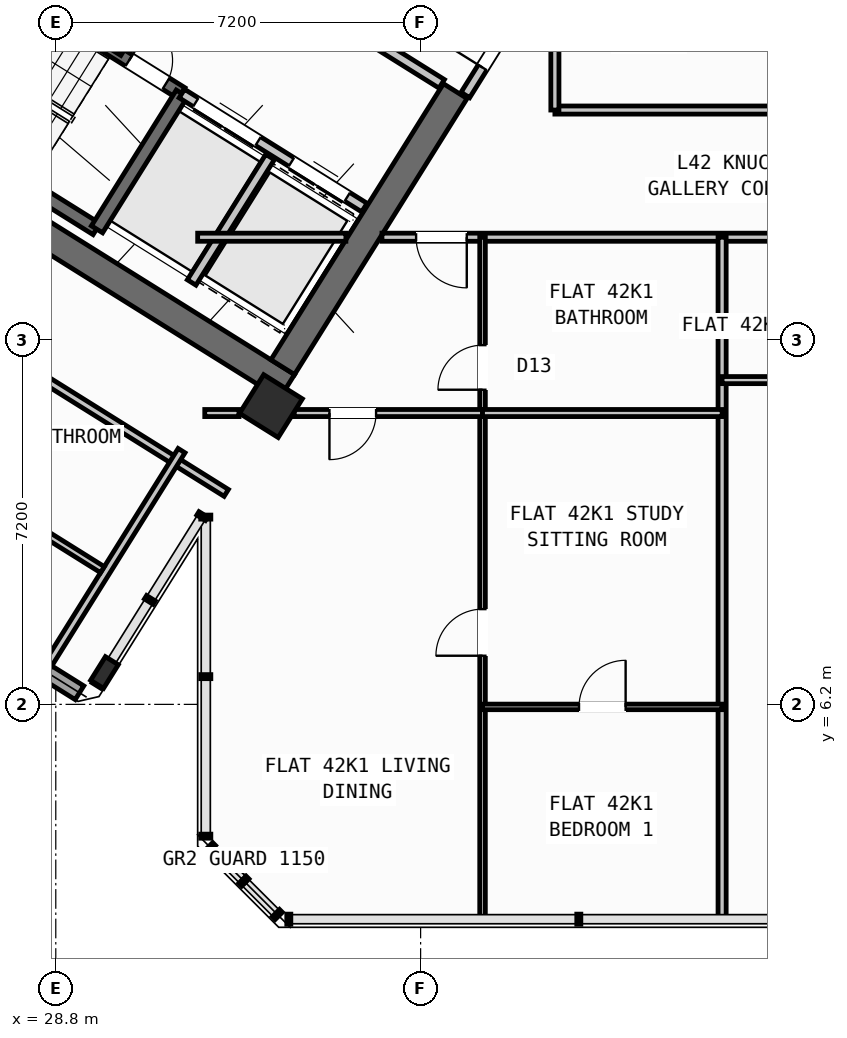
"""IFC4 building model, lengths in metres.
Left out: names, types, materials, properties, quantities, classifications, styles, units other than length and angle.
Written with IfcOpenShell. Run it as: python <this file> out.ifc"""

import sys

from ifc_helpers import new_model, si_unit, direction, frame, frame_2d, origin, origin_2d, place, context, subcontext, project, spatial, rectangle, hollow_rectangle, i_section, extrude, source, transform, mapped, element, fill, save


model = new_model("IFC4")
c1 = context("Model", 3, precision=1e-05, world=origin(), true_north=direction((0.0, 1.0)))
c2 = subcontext(c1, "Body", "Model", "MODEL_VIEW")
j1 = project(units=[si_unit("LENGTHUNIT", "METRE"), si_unit("PLANEANGLEUNIT", "RADIAN")], contexts=[c1])
p1 = place(None, origin())
s1 = spatial("IfcSite", under=j1, at=p1, CompositionType="ELEMENT")
p2 = place(p1, origin())
s2 = spatial("IfcBuilding", under=s1, at=p2, CompositionType="ELEMENT")
p3 = place(p2, frame((0.0, 0.0, 165.9)))
s3 = spatial("IfcBuildingStorey", under=s2, at=p3, CompositionType="ELEMENT", Elevation=165.9)
p4 = place(p3, frame((33.366, 12.477, 0.0), z_axis=(0.0, 0.0, 1.0), x_axis=(-0.848047359947, 0.529920442413, 0.0)))
e1 = element("IfcWall", 1, at=p4, inside=s3, PredefinedType="SHEAR", context=c2, shape_type="SweptSolid", body=[
    extrude(rectangle(XDim=13.14, YDim=0.55, at=frame_2d((6.57, 0.0))), origin(), (0.0, 0.0, 1.0), 3.32),
])
p5 = place(p3, frame((36.683, 18.304, 0.0), z_axis=(0.0, 0.0, 1.0), x_axis=(-0.529896466841, -0.848062341122, 0.0)))
e2 = element("IfcWall", 2, at=p5, inside=s3, PredefinedType="SHEAR", context=c2, shape_type="SweptSolid", body=[
    extrude(rectangle(XDim=6.425, YDim=0.55, at=frame_2d((3.212, 0.0))), origin(), (0.0, 0.0, 1.0), 3.32),
])
m1 = source(origin(), c2, "Body", "SweptSolid", [
    extrude(hollow_rectangle(XDim=0.9, YDim=0.9, WallThickness=0.036, at=origin_2d()), origin(), (0.0, 0.0, 1.0), 3.6),
])
p6 = place(p3, frame((33.046, 12.087, 0.0), z_axis=(0.0, 0.0, 1.0), x_axis=(-0.848048096156, 0.529919264233, 0.0)))
e3 = element("IfcColumn", 3, at=p6, inside=s3, PredefinedType="COLUMN", context=c2, shape_type="MappedRepresentation", body=[
    mapped(m1, transform((0.0, 0.0, 0.0), scale=1.0)),
])
m2 = source(origin(), c2, "Body", "SweptSolid", [
    extrude(i_section(OverallWidth=0.3, OverallDepth=0.55, WebThickness=0.015, FlangeThickness=0.029, at=origin_2d()), origin(), (0.0, 0.0, 1.0), 3.6),
])
p7 = place(p3, frame((29.761, 6.829, 0.0), z_axis=(0.0, 0.0, 1.0), x_axis=(-0.848048096156, 0.529919264233, 0.0)))
e4 = element("IfcColumn", 4, at=p7, inside=s3, PredefinedType="COLUMN", context=c2, shape_type="MappedRepresentation", body=[
    mapped(m2, transform((0.0, 0.0, 0.0), scale=1.0)),
])
p8 = place(p3, frame((29.268, 6.429, 0.0), z_axis=(0.0, 0.0, 1.0), x_axis=(-0.848049971435, 0.529916263149, 0.0)))
e5 = element("IfcWall", 5, at=p8, inside=s3, PredefinedType="STANDARD", context=c2, shape_type="SweptSolid", body=[
    extrude(rectangle(XDim=31.588, YDim=0.32, at=frame_2d((15.794, 0.0))), origin(), (0.0, 0.0, 1.0), 3.32),
])
p9 = place(p8, frame((16.362, 0.0, 0.0)))
e6 = element("IfcOpeningElement", 6, at=p9, cuts=e5, PredefinedType="OPENING", context=c2, shape_type="SweptSolid", body=[
    extrude(rectangle(XDim=1.2, YDim=2.15, at=frame_2d((0.6, 1.075))), frame((0.0, 0.17, 0.0), z_axis=(0.0, -1.0, 0.0), x_axis=(1.0, 0.0, 0.0)), (0.0, 0.0, 1.0), 0.34),
])
p10 = place(p8, frame((2.989, 0.0, 0.8)))
e7 = element("IfcOpeningElement", 7, at=p10, cuts=e5, PredefinedType="OPENING", context=c2, shape_type="SweptSolid", body=[
    extrude(rectangle(XDim=2.1, YDim=1.55, at=frame_2d((1.05, 0.775))), frame((0.0, 0.17, 0.0), z_axis=(0.0, -1.0, 0.0), x_axis=(1.0, 0.0, 0.0)), (0.0, 0.0, 1.0), 0.34),
])
p11 = place(p8, frame((8.359, 0.0, 0.8)))
e8 = element("IfcOpeningElement", 8, at=p11, cuts=e5, PredefinedType="OPENING", context=c2, shape_type="SweptSolid", body=[
    extrude(rectangle(XDim=2.1, YDim=1.55, at=frame_2d((1.05, 0.775))), frame((0.0, 0.17, 0.0), z_axis=(0.0, -1.0, 0.0), x_axis=(1.0, 0.0, 0.0)), (0.0, 0.0, 1.0), 0.34),
])
p12 = place(p8, frame((13.284, 0.0, 0.95)))
e9 = element("IfcOpeningElement", 9, at=p12, cuts=e5, PredefinedType="OPENING", context=c2, shape_type="SweptSolid", body=[
    extrude(rectangle(XDim=1.2, YDim=1.4, at=frame_2d((0.6, 0.7))), frame((0.0, 0.17, 0.0), z_axis=(0.0, -1.0, 0.0), x_axis=(1.0, 0.0, 0.0)), (0.0, 0.0, 1.0), 0.34),
])
p13 = place(p8, frame((20.39, 0.0, 0.95)))
e10 = element("IfcOpeningElement", 10, at=p13, cuts=e5, PredefinedType="OPENING", context=c2, shape_type="SweptSolid", body=[
    extrude(rectangle(XDim=1.2, YDim=1.4, at=frame_2d((0.6, 0.7))), frame((0.0, 0.17, 0.0), z_axis=(0.0, -1.0, 0.0), x_axis=(1.0, 0.0, 0.0)), (0.0, 0.0, 1.0), 0.34),
])
p14 = place(p8, frame((23.715, 0.0, 1.0)))
e11 = element("IfcOpeningElement", 11, at=p14, cuts=e5, PredefinedType="OPENING", context=c2, shape_type="SweptSolid", body=[
    extrude(rectangle(XDim=0.9, YDim=1.25, at=frame_2d((0.45, 0.625))), frame((0.0, 0.17, 0.0), z_axis=(0.0, -1.0, 0.0), x_axis=(1.0, 0.0, 0.0)), (0.0, 0.0, 1.0), 0.34),
])
p15 = place(p8, frame((26.106, 0.0, 0.85)))
e12 = element("IfcOpeningElement", 12, at=p15, cuts=e5, PredefinedType="OPENING", context=c2, shape_type="SweptSolid", body=[
    extrude(rectangle(XDim=1.5, YDim=1.5, at=frame_2d((0.75, 0.75))), frame((0.0, 0.17, 0.0), z_axis=(0.0, -1.0, 0.0), x_axis=(1.0, 0.0, 0.0)), (0.0, 0.0, 1.0), 0.34),
])
p16 = place(p8, frame((29.068, 0.0, 0.85)))
e13 = element("IfcOpeningElement", 13, at=p16, cuts=e5, PredefinedType="OPENING", context=c2, shape_type="SweptSolid", body=[
    extrude(rectangle(XDim=1.8, YDim=1.5, at=frame_2d((0.9, 0.75))), frame((0.0, 0.17, 0.0), z_axis=(0.0, -1.0, 0.0), x_axis=(1.0, 0.0, 0.0)), (0.0, 0.0, 1.0), 0.34),
])
p17 = place(p3, frame((29.605, 15.581, 0.0), z_axis=(0.0, 0.0, 1.0), x_axis=(-0.848036911448, 0.529937163087, 0.0)))
e14 = element("IfcWall", 14, at=p17, inside=s3, PredefinedType="SHEAR", context=c2, shape_type="SweptSolid", body=[
    extrude(rectangle(XDim=7.46, YDim=0.26, at=frame_2d((3.73, 0.0))), origin(), (0.0, 0.0, 1.0), 3.32),
])
p18 = place(p3, frame((31.28, 18.261, 0.0), z_axis=(0.0, 0.0, 1.0), x_axis=(-0.848051618787, 0.529913626805, 0.0)))
e15 = element("IfcWall", 15, at=p18, inside=s3, PredefinedType="SHEAR", context=c2, shape_type="SweptSolid", body=[
    extrude(rectangle(XDim=7.46, YDim=0.26, at=frame_2d((3.73, 0.0))), origin(), (0.0, 0.0, 1.0), 3.32),
])
p19 = place(p18, frame((0.36, 0.0, 0.0)))
e16 = element("IfcOpeningElement", 16, at=p19, cuts=e15, PredefinedType="OPENING", context=c2, shape_type="SweptSolid", body=[
    extrude(rectangle(XDim=0.86, YDim=2.05, at=frame_2d((0.43, 1.025))), frame((0.0, 0.14, 0.0), z_axis=(0.0, -1.0, 0.0), x_axis=(1.0, 0.0, 0.0)), (0.0, 0.0, 1.0), 0.28),
])
p20 = place(p3, frame((31.288, 18.256, 0.0), z_axis=(0.0, 0.0, 1.0), x_axis=(-0.529943379326, -0.848033026897, 0.0)))
e17 = element("IfcWall", 17, at=p20, inside=s3, PredefinedType="SHEAR", context=c2, shape_type="SweptSolid", body=[
    extrude(rectangle(XDim=3.16, YDim=0.26, at=frame_2d((1.58, 0.0))), origin(), (0.0, 0.0, 1.0), 3.32),
])
p21 = place(p3, frame((34.891, 16.005, 0.0), z_axis=(0.0, 0.0, 1.0), x_axis=(-0.848062873452, 0.529895614884, 0.0)))
e18 = element("IfcWall", 18, at=p21, inside=s3, PredefinedType="STANDARD", context=c2, shape_type="SweptSolid", body=[
    extrude(rectangle(XDim=4.248, YDim=0.2, at=frame_2d((2.124, 0.0))), origin(), (0.0, 0.0, 1.0), 3.31),
])
p22 = place(p21, frame((0.398, 0.0, 0.0)))
e19 = element("IfcOpeningElement", 19, at=p22, cuts=e18, PredefinedType="OPENING", context=c2, shape_type="SweptSolid", body=[
    extrude(rectangle(XDim=1.3, YDim=2.2, at=frame_2d((0.65, 1.1))), frame((0.0, 0.11, 0.0), z_axis=(0.0, -1.0, 0.0), x_axis=(1.0, 0.0, 0.0)), (0.0, 0.0, 1.0), 0.22),
])
p23 = place(p21, frame((2.473, 0.0, 0.0)))
e20 = element("IfcOpeningElement", 20, at=p23, cuts=e18, PredefinedType="OPENING", context=c2, shape_type="SweptSolid", body=[
    extrude(rectangle(XDim=1.45, YDim=2.25, at=frame_2d((0.725, 1.125))), frame((0.0, 0.11, 0.0), z_axis=(0.0, -1.0, 0.0), x_axis=(1.0, 0.0, 0.0)), (0.0, 0.0, 1.0), 0.22),
])
p24 = place(p3, frame((36.417, 18.447, 0.0), z_axis=(0.0, 0.0, 1.0), x_axis=(-0.848064879198, 0.529892404805, 0.0)))
e21 = element("IfcWall", 21, at=p24, inside=s3, PredefinedType="STANDARD", context=c2, shape_type="SweptSolid", body=[
    extrude(rectangle(XDim=5.768, YDim=0.2, at=frame_2d((2.884, 0.0))), origin(), (0.0, 0.0, 1.0), 3.31),
])
p25 = place(p24, frame((2.548, 0.0, 0.0)))
e22 = element("IfcOpeningElement", 22, at=p25, cuts=e21, PredefinedType="OPENING", context=c2, shape_type="SweptSolid", body=[
    extrude(rectangle(XDim=1.15, YDim=2.1, at=frame_2d((0.575, 1.05))), frame((0.0, 0.11, 0.0), z_axis=(0.0, -1.0, 0.0), x_axis=(1.0, 0.0, 0.0)), (0.0, 0.0, 1.0), 0.22),
])
p26 = place(p3, frame((33.029, 17.003, 0.0), z_axis=(0.0, 0.0, 1.0), x_axis=(-0.529916267533, -0.848049968695, 0.0)))
e23 = element("IfcWall", 23, at=p26, inside=s3, PredefinedType="STANDARD", context=c2, shape_type="SweptSolid", body=[
    extrude(rectangle(XDim=2.92, YDim=0.2, at=frame_2d((1.46, 0.0))), origin(), (0.0, 0.0, 1.0), 3.31),
])
p27 = place(p3, frame((31.525, 21.504, 0.0), z_axis=(0.0, 0.0, 1.0), x_axis=(-0.529907497854, -0.848055448493, 0.0)))
e24 = element("IfcWall", 24, at=p27, inside=s3, PredefinedType="STANDARD", context=c2, shape_type="SweptSolid", body=[
    extrude(rectangle(XDim=2.88, YDim=0.2, at=frame_2d((1.44, 0.0))), origin(), (0.0, 0.0, 1.0), 3.31),
])
p28 = place(p3, frame((32.164, 10.374, 0.0), z_axis=(0.0, 0.0, 1.0), x_axis=(-0.848044107957, 0.529925646633, 0.0)))
e25 = element("IfcWall", 25, at=p28, inside=s3, PredefinedType="PARTITIONING", context=c2, shape_type="SweptSolid", body=[
    extrude(rectangle(XDim=15.57, YDim=0.16, at=frame_2d((7.785, 0.0))), origin(), (0.0, 0.0, 1.0), 3.31),
])
p29 = place(p28, frame((10.83, 0.0, 0.0)))
e26 = element("IfcOpeningElement", 26, at=p29, cuts=e25, PredefinedType="OPENING", context=c2, shape_type="SweptSolid", body=[
    extrude(rectangle(XDim=1.0, YDim=2.1, at=frame_2d((0.5, 1.05))), frame((0.0, 0.09, 0.0), z_axis=(0.0, -1.0, 0.0), x_axis=(1.0, 0.0, 0.0)), (0.0, 0.0, 1.0), 0.18),
])
p30 = place(p3, frame((31.282, 11.208, 0.0), z_axis=(0.0, 0.0, 1.0), x_axis=(-0.529938869374, -0.84803584519, 0.0)))
e27 = element("IfcWall", 27, at=p30, inside=s3, PredefinedType="PARTITIONING", context=c2, shape_type="SweptSolid", body=[
    extrude(rectangle(XDim=5.48, YDim=0.16, at=frame_2d((2.74, 0.0))), origin(), (0.0, 0.0, 1.0), 3.31),
])
p31 = place(p3, frame((29.72, 8.859, 0.0), z_axis=(0.0, 0.0, 1.0), x_axis=(-0.848049134363, 0.529917602752, 0.0)))
e28 = element("IfcWall", 28, at=p31, inside=s3, PredefinedType="PLUMBINGWALL", context=c2, shape_type="SweptSolid", body=[
    extrude(rectangle(XDim=14.3, YDim=0.14, at=frame_2d((7.15, 0.0))), origin(), (0.0, 0.0, 1.0), 3.31),
])
p32 = place(p31, frame((9.57, 0.0, 0.0)))
e29 = element("IfcOpeningElement", 29, at=p32, cuts=e28, PredefinedType="OPENING", context=c2, shape_type="SweptSolid", body=[
    extrude(rectangle(XDim=0.92, YDim=2.08, at=frame_2d((0.46, 1.04))), frame((0.0, 0.08, 0.0), z_axis=(0.0, -1.0, 0.0), x_axis=(1.0, 0.0, 0.0)), (0.0, 0.0, 1.0), 0.16),
])
p33 = place(p3, frame((38.451, 20.737, 0.0), z_axis=(0.0, 0.0, 1.0), x_axis=(-0.529924799939, -0.848044637038, 0.0)))
e30 = element("IfcWall", 30, at=p33, inside=s3, PredefinedType="STANDARD", context=c2, shape_type="SweptSolid", body=[
    extrude(rectangle(XDim=2.96, YDim=0.2, at=frame_2d((1.48, 0.0))), origin(), (0.0, 0.0, 1.0), 3.31),
])
p34 = place(p33, frame((1.46, 0.0, 0.0)))
e31 = element("IfcOpeningElement", 31, at=p34, cuts=e30, PredefinedType="OPENING", context=c2, shape_type="SweptSolid", body=[
    extrude(rectangle(XDim=0.86, YDim=2.05, at=frame_2d((0.43, 1.025))), frame((0.0, 0.11, 0.0), z_axis=(0.0, -1.0, 0.0), x_axis=(1.0, 0.0, 0.0)), (0.0, 0.0, 1.0), 0.22),
])
p35 = place(p3, frame((31.6, 15.42, 0.0), z_axis=(0.0, 0.0, 1.0), x_axis=(1.0, 0.0, 0.0)))
e32 = element("IfcWall", 32, at=p35, inside=s3, PredefinedType="PARTITIONING", context=c2, shape_type="SweptSolid", body=[
    extrude(rectangle(XDim=2.925, YDim=0.16, at=frame_2d((1.462, 0.0))), origin(), (0.0, 0.0, 1.0), 3.31),
])
p36 = place(p3, frame((35.237, 15.42, 0.0), z_axis=(0.0, 0.0, 1.0), x_axis=(1.0, 0.0, 0.0)))
e33 = element("IfcWall", 33, at=p36, inside=s3, PredefinedType="PARTITIONING", context=c2, shape_type="SweptSolid", body=[
    extrude(rectangle(XDim=15.432, YDim=0.16, at=frame_2d((7.716, 0.0))), origin(), (0.0, 0.0, 1.0), 3.31),
])
p37 = place(p36, frame((0.674, 0.0, 0.0)))
e34 = element("IfcOpeningElement", 34, at=p37, cuts=e33, PredefinedType="OPENING", context=c2, shape_type="SweptSolid", body=[
    extrude(rectangle(XDim=1.0, YDim=2.1, at=frame_2d((0.5, 1.05))), frame((0.0, 0.09, 0.0), z_axis=(0.0, -1.0, 0.0), x_axis=(1.0, 0.0, 0.0)), (0.0, 0.0, 1.0), 0.18),
])
p38 = place(p36, frame((9.094, 0.0, 0.0)))
e35 = element("IfcOpeningElement", 35, at=p38, cuts=e33, PredefinedType="OPENING", context=c2, shape_type="SweptSolid", body=[
    extrude(rectangle(XDim=1.0, YDim=2.1, at=frame_2d((0.5, 1.05))), frame((0.0, 0.09, 0.0), z_axis=(0.0, -1.0, 0.0), x_axis=(1.0, 0.0, 0.0)), (0.0, 0.0, 1.0), 0.18),
])
p39 = place(p3, frame((38.65, 17.93, 0.0), z_axis=(0.0, 0.0, 1.0), x_axis=(1.0, 0.0, 0.0)))
e36 = element("IfcWall", 36, at=p39, inside=s3, PredefinedType="PARTITIONING", context=c2, shape_type="SweptSolid", body=[
    extrude(rectangle(XDim=9.95, YDim=0.16, at=frame_2d((4.975, 0.0))), origin(), (0.0, 0.0, 1.0), 3.31),
])
p40 = place(p39, frame((4.475, 0.0, 0.0)))
e37 = element("IfcOpeningElement", 37, at=p40, cuts=e36, PredefinedType="OPENING", context=c2, shape_type="SweptSolid", body=[
    extrude(rectangle(XDim=1.0, YDim=2.1, at=frame_2d((0.5, 1.05))), frame((0.0, 0.09, 0.0), z_axis=(0.0, -1.0, 0.0), x_axis=(1.0, 0.0, 0.0)), (0.0, 0.0, 1.0), 0.18),
])
p41 = place(p3, frame((38.65, 17.93, 0.0), z_axis=(0.0, 0.0, 1.0), x_axis=(0.0, 1.0, 0.0)))
e38 = element("IfcWall", 38, at=p41, inside=s3, PredefinedType="PARTITIONING", context=c2, shape_type="SweptSolid", body=[
    extrude(rectangle(XDim=2.951, YDim=0.16, at=frame_2d((1.476, 0.0))), origin(), (0.0, 0.0, 1.0), 3.31),
])
p42 = place(p3, frame((41.95, 1.96, 0.0), z_axis=(0.0, 0.0, 1.0), x_axis=(0.0, 1.0, 0.0)))
e39 = element("IfcWall", 39, at=p42, inside=s3, PredefinedType="PARTITIONING", context=c2, shape_type="SweptSolid", body=[
    extrude(rectangle(XDim=13.46, YDim=0.16, at=frame_2d((6.73, 0.0))), origin(), (0.0, 0.0, 1.0), 3.31),
])
p43 = place(p3, frame((37.222, 1.96, 0.0), z_axis=(0.0, 0.0, 1.0), x_axis=(0.0, 1.0, 0.0)))
e40 = element("IfcWall", 40, at=p43, inside=s3, PredefinedType="PARTITIONING", context=c2, shape_type="SweptSolid", body=[
    extrude(rectangle(XDim=13.46, YDim=0.11, at=frame_2d((6.73, 0.0))), origin(), (0.0, 0.0, 1.0), 3.31),
])
p44 = place(p43, frame((5.2, 0.0, 0.0)))
e41 = element("IfcOpeningElement", 41, at=p44, cuts=e40, PredefinedType="OPENING", context=c2, shape_type="SweptSolid", body=[
    extrude(rectangle(XDim=0.92, YDim=2.08, at=frame_2d((0.46, 1.04))), frame((0.0, 0.065, 0.0), z_axis=(0.0, -1.0, 0.0), x_axis=(1.0, 0.0, 0.0)), (0.0, 0.0, 1.0), 0.13),
])
p45 = place(p43, frame((10.45, 0.0, 0.0)))
e42 = element("IfcOpeningElement", 42, at=p45, cuts=e40, PredefinedType="OPENING", context=c2, shape_type="SweptSolid", body=[
    extrude(rectangle(XDim=0.88, YDim=2.08, at=frame_2d((0.44, 1.04))), frame((0.0, 0.065, 0.0), z_axis=(0.0, -1.0, 0.0), x_axis=(1.0, 0.0, 0.0)), (0.0, 0.0, 1.0), 0.13),
])
p46 = place(p3, frame((31.74, 11.95, 0.0), z_axis=(0.0, 0.0, 1.0), x_axis=(1.0, 0.0, 0.0)))
e43 = element("IfcWall", 43, at=p46, inside=s3, PredefinedType="PLUMBINGWALL", context=c2, shape_type="SweptSolid", body=[
    extrude(rectangle(XDim=0.676, YDim=0.14, at=frame_2d((0.338, 0.0))), origin(), (0.0, 0.0, 1.0), 3.31),
])
p47 = place(p3, frame((33.505, 11.95, 0.0), z_axis=(0.0, 0.0, 1.0), x_axis=(1.0, 0.0, 0.0)))
e44 = element("IfcWall", 44, at=p47, inside=s3, PredefinedType="PLUMBINGWALL", context=c2, shape_type="SweptSolid", body=[
    extrude(rectangle(XDim=3.717, YDim=0.14, at=frame_2d((1.858, 0.0))), origin(), (0.0, 0.0, 1.0), 2.495),
])
p48 = place(p47, frame((0.696, 0.0, 0.0)))
e45 = element("IfcOpeningElement", 45, at=p48, cuts=e44, PredefinedType="OPENING", context=c2, shape_type="SweptSolid", body=[
    extrude(rectangle(XDim=0.92, YDim=2.08, at=frame_2d((0.46, 1.04))), frame((0.0, 0.08, 0.0), z_axis=(0.0, -1.0, 0.0), x_axis=(1.0, 0.0, 0.0)), (0.0, 0.0, 1.0), 0.16),
])
p49 = place(p3, frame((37.222, 11.95, 0.0), z_axis=(0.0, 0.0, 1.0), x_axis=(1.0, 0.0, 0.0)))
e46 = element("IfcWall", 46, at=p49, inside=s3, PredefinedType="PLUMBINGWALL", context=c2, shape_type="SweptSolid", body=[
    extrude(rectangle(XDim=4.728, YDim=0.14, at=frame_2d((2.364, 0.0))), origin(), (0.0, 0.0, 1.0), 2.495),
])
p50 = place(p3, frame((37.222, 6.15, 0.0), z_axis=(0.0, 0.0, 1.0), x_axis=(1.0, 0.0, 0.0)))
e47 = element("IfcWall", 47, at=p50, inside=s3, PredefinedType="PARTITIONING", context=c2, shape_type="SweptSolid", body=[
    extrude(rectangle(XDim=4.728, YDim=0.11, at=frame_2d((2.364, 0.0))), origin(), (0.0, 0.0, 1.0), 3.31),
])
p51 = place(p50, frame((1.904, 0.0, 0.0)))
e48 = element("IfcOpeningElement", 48, at=p51, cuts=e47, PredefinedType="OPENING", context=c2, shape_type="SweptSolid", body=[
    extrude(rectangle(XDim=0.92, YDim=2.08, at=frame_2d((0.46, 1.04))), frame((0.0, 0.065, 0.0), z_axis=(0.0, -1.0, 0.0), x_axis=(1.0, 0.0, 0.0)), (0.0, 0.0, 1.0), 0.13),
])
p52 = place(p3, frame((41.95, 12.6, 0.0), z_axis=(0.0, 0.0, 1.0), x_axis=(1.0, 0.0, 0.0)))
e49 = element("IfcWall", 49, at=p52, inside=s3, PredefinedType="PLUMBINGWALL", context=c2, shape_type="SweptSolid", body=[
    extrude(rectangle(XDim=5.713, YDim=0.14, at=frame_2d((2.856, 0.0))), origin(), (0.0, 0.0, 1.0), 2.495),
])
p53 = place(p52, frame((2.396, 0.0, 0.0)))
e50 = element("IfcOpeningElement", 50, at=p53, cuts=e49, PredefinedType="OPENING", context=c2, shape_type="SweptSolid", body=[
    extrude(rectangle(XDim=0.92, YDim=2.08, at=frame_2d((0.46, 1.04))), frame((0.0, 0.08, 0.0), z_axis=(0.0, -1.0, 0.0), x_axis=(1.0, 0.0, 0.0)), (0.0, 0.0, 1.0), 0.16),
])
m3 = source(origin(), c2, "Body", "SweptSolid", [
    extrude(rectangle(XDim=0.86, YDim=2.05, at=frame_2d((0.43, 1.025))), frame((0.0, 0.025, 0.0), z_axis=(0.0, -1.0, 0.0), x_axis=(1.0, 0.0, 0.0)), (0.0, 0.0, 1.0), 0.05),
])
p54 = place(p19, frame((0.86, 0.0, 0.0), z_axis=(0.0, 0.0, 1.0), x_axis=(-1.0, 0.0, 0.0)))
e51 = element("IfcDoor", 51, at=p54, inside=s3, OperationType="SINGLE_SWING_LEFT", PredefinedType="DOOR", context=c2, shape_type="MappedRepresentation", body=[
    mapped(m3, transform((0.0, 0.0, 0.0), scale=1.0)),
])
fill(e16, e51)
m4 = source(origin(), c2, "Body", "SweptSolid", [
    extrude(rectangle(XDim=1.3, YDim=2.2, at=frame_2d((0.65, 1.1))), frame((0.0, 0.025, 0.0), z_axis=(0.0, -1.0, 0.0), x_axis=(1.0, 0.0, 0.0)), (0.0, 0.0, 1.0), 0.05),
])
p55 = place(p22, origin())
e52 = element("IfcDoor", 52, at=p55, inside=s3, OperationType="DOUBLE_DOOR_SLIDING", PredefinedType="DOOR", context=c2, shape_type="MappedRepresentation", body=[
    mapped(m4, transform((0.0, 0.0, 0.0), scale=1.0)),
])
fill(e19, e52)
m5 = source(origin(), c2, "Body", "SweptSolid", [
    extrude(rectangle(XDim=1.45, YDim=2.25, at=frame_2d((0.725, 1.125))), frame((0.0, 0.025, 0.0), z_axis=(0.0, -1.0, 0.0), x_axis=(1.0, 0.0, 0.0)), (0.0, 0.0, 1.0), 0.05),
])
p56 = place(p23, origin())
e53 = element("IfcDoor", 53, at=p56, inside=s3, OperationType="DOUBLE_DOOR_SLIDING", PredefinedType="DOOR", context=c2, shape_type="MappedRepresentation", body=[
    mapped(m5, transform((0.0, 0.0, 0.0), scale=1.0)),
])
fill(e20, e53)
p57 = place(p34, frame((0.86, 0.0, 0.0), z_axis=(0.0, 0.0, 1.0), x_axis=(-1.0, 0.0, 0.0)))
e54 = element("IfcDoor", 54, at=p57, inside=s3, OperationType="SINGLE_SWING_LEFT", PredefinedType="DOOR", context=c2, shape_type="MappedRepresentation", body=[
    mapped(m3, transform((0.0, 0.0, 0.0), scale=1.0)),
])
fill(e31, e54)
m6 = source(origin(), c2, "Body", "SweptSolid", [
    extrude(rectangle(XDim=0.92, YDim=2.08, at=frame_2d((0.46, 1.04))), frame((0.0, 0.025, 0.0), z_axis=(0.0, -1.0, 0.0), x_axis=(1.0, 0.0, 0.0)), (0.0, 0.0, 1.0), 0.05),
])
p58 = place(p44, origin())
e55 = element("IfcDoor", 55, at=p58, inside=s3, OperationType="SINGLE_SWING_LEFT", PredefinedType="DOOR", context=c2, shape_type="MappedRepresentation", body=[
    mapped(m6, transform((0.0, 0.0, 0.0), scale=1.0)),
])
fill(e41, e55)
p59 = place(p51, origin())
e56 = element("IfcDoor", 56, at=p59, inside=s3, OperationType="SINGLE_SWING_RIGHT", PredefinedType="DOOR", context=c2, shape_type="MappedRepresentation", body=[
    mapped(m6, transform((0.0, 0.0, 0.0), scale=1.0)),
])
fill(e48, e56)
m7 = source(origin(), c2, "Body", "SweptSolid", [
    extrude(rectangle(XDim=1.0, YDim=2.1, at=frame_2d((0.5, 1.05))), frame((0.0, 0.025, 0.0), z_axis=(0.0, -1.0, 0.0), x_axis=(1.0, 0.0, 0.0)), (0.0, 0.0, 1.0), 0.05),
])
p60 = place(p37, frame((1.0, 0.0, 0.0), z_axis=(0.0, 0.0, 1.0), x_axis=(-1.0, 0.0, 0.0)))
e57 = element("IfcDoor", 57, at=p60, inside=s3, OperationType="SINGLE_SWING_LEFT", PredefinedType="DOOR", context=c2, shape_type="MappedRepresentation", body=[
    mapped(m7, transform((0.0, 0.0, 0.0), scale=1.0)),
])
fill(e34, e57)
p61 = place(p48, frame((0.92, 0.0, 0.0), z_axis=(0.0, 0.0, 1.0), x_axis=(-1.0, 0.0, 0.0)))
e58 = element("IfcDoor", 58, at=p61, inside=s3, OperationType="SINGLE_SWING_RIGHT", PredefinedType="DOOR", context=c2, shape_type="MappedRepresentation", body=[
    mapped(m6, transform((0.0, 0.0, 0.0), scale=1.0)),
])
fill(e45, e58)
m8 = source(origin(), c2, "Body", "SweptSolid", [
    extrude(rectangle(XDim=0.88, YDim=2.08, at=frame_2d((0.44, 1.04))), frame((0.0, 0.025, 0.0), z_axis=(0.0, -1.0, 0.0), x_axis=(1.0, 0.0, 0.0)), (0.0, 0.0, 1.0), 0.05),
])
p62 = place(p45, origin())
e59 = element("IfcDoor", 59, at=p62, inside=s3, OperationType="SINGLE_SWING_LEFT", PredefinedType="DOOR", context=c2, shape_type="MappedRepresentation", body=[
    mapped(m8, transform((0.0, 0.0, 0.0), scale=1.0)),
])
fill(e42, e59)
save(model, sys.argv[1])
